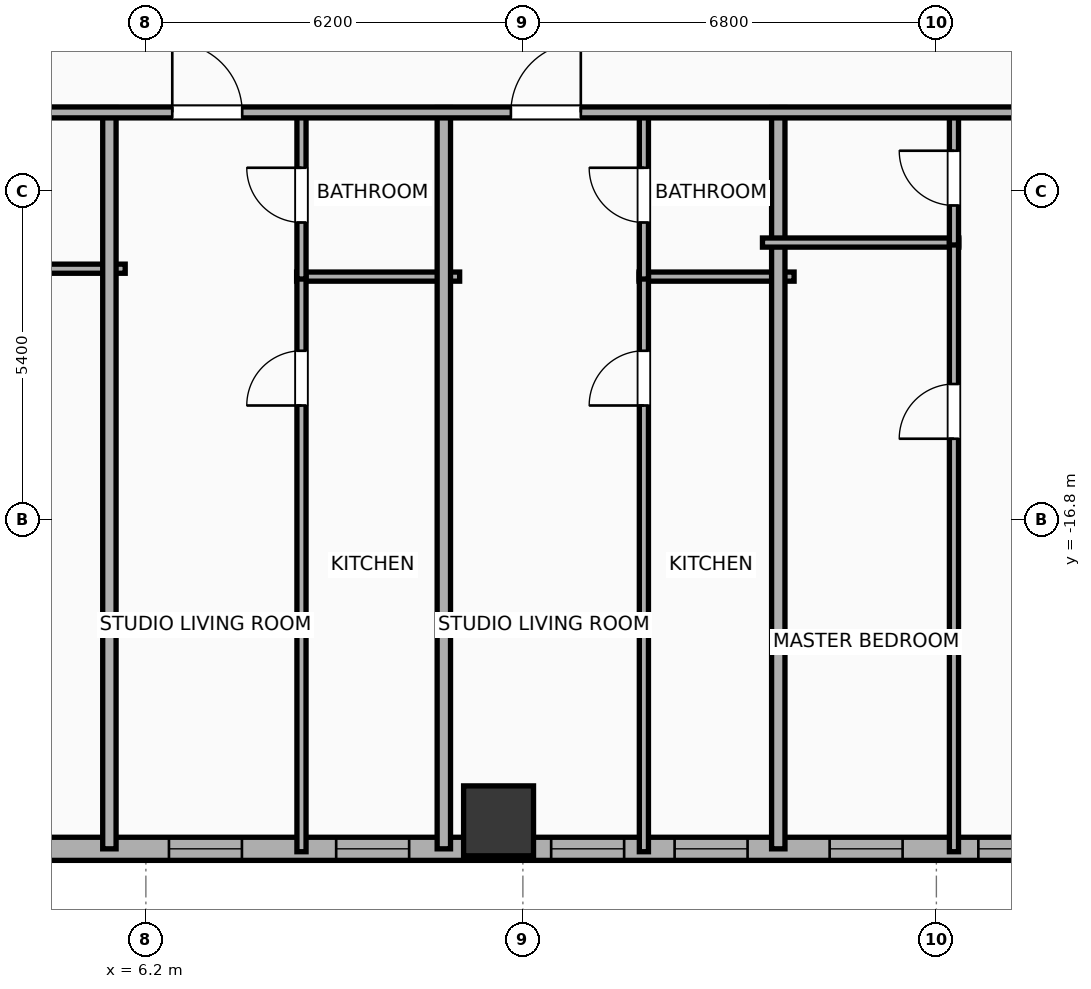
"""IFC4 building model, lengths in metres.
Left out: names, types, materials, properties, quantities, classifications, styles, units other than length and angle.
Written with IfcOpenShell. Run it as: python <this file> out.ifc"""

import sys

from ifc_helpers import new_model, si_unit, direction, frame, frame_2d, origin, origin_2d, place, context, subcontext, project, spatial, rectangle, hollow_rectangle, extrude, element, fill, save


model = new_model("IFC4")
c1 = context("Model", 3, precision=1e-05, world=origin(), true_north=direction((0.0, 1.0)))
c2 = subcontext(c1, "Body", "Model", "MODEL_VIEW")
j1 = project(units=[si_unit("LENGTHUNIT", "METRE"), si_unit("PLANEANGLEUNIT", "RADIAN")], contexts=[c1])
p1 = place(None, origin())
s1 = spatial("IfcSite", under=j1, at=p1, CompositionType="ELEMENT")
p2 = place(p1, origin())
s2 = spatial("IfcBuilding", under=s1, at=p2, CompositionType="ELEMENT")
p3 = place(p2, frame((0.0, 0.0, 37.7)))
s3 = spatial("IfcBuildingStorey", under=s2, at=p3, CompositionType="ELEMENT", Elevation=37.7)
p4 = place(p3, frame((12.0, -21.75, 0.0), z_axis=(0.0, 0.0, 1.0), x_axis=(1.0, 0.0, 0.0)))
e1 = element("IfcColumn", 1, at=p4, inside=s3, PredefinedType="COLUMN", context=c2, shape_type="SweptSolid", body=[
    extrude(hollow_rectangle(XDim=1.15, YDim=1.15, WallThickness=0.04, at=origin_2d()), origin(), (0.0, 0.0, 1.0), 3.9),
])
p5 = place(p3, frame((22.381, -22.21, 0.0), z_axis=(0.0, 0.0, 1.0), x_axis=(-1.0, 0.0, 0.0)))
e2 = element("IfcWall", 2, at=p5, inside=s3, PredefinedType="ELEMENTEDWALL", context=c2, shape_type="SweptSolid", body=[
    extrude(rectangle(XDim=51.963, YDim=0.38, at=frame_2d((25.981, 0.0))), origin(), (0.0, 0.0, 1.0), 3.65),
])
p6 = place(p5, frame((42.952, 0.0, 0.75)))
e3 = element("IfcOpeningElement", 3, at=p6, cuts=e2, PredefinedType="OPENING", context=c2, shape_type="SweptSolid", body=[
    extrude(rectangle(XDim=2.4, YDim=2.1, at=frame_2d((1.2, 1.05))), frame((0.0, 0.2, 0.0), z_axis=(0.0, -1.0, 0.0), x_axis=(1.0, 0.0, 0.0)), (0.0, 0.0, 1.0), 0.4),
])
p7 = place(p5, frame((49.847, 0.0, 0.75)))
e4 = element("IfcOpeningElement", 4, at=p7, cuts=e2, PredefinedType="OPENING", context=c2, shape_type="SweptSolid", body=[
    extrude(rectangle(XDim=1.2, YDim=2.05, at=frame_2d((0.6, 1.025))), frame((0.0, 0.2, 0.0), z_axis=(0.0, -1.0, 0.0), x_axis=(1.0, 0.0, 0.0)), (0.0, 0.0, 1.0), 0.4),
])
p8 = place(p5, frame((47.445, 0.0, 0.75)))
e5 = element("IfcOpeningElement", 5, at=p8, cuts=e2, PredefinedType="OPENING", context=c2, shape_type="SweptSolid", body=[
    extrude(rectangle(XDim=1.2, YDim=2.05, at=frame_2d((0.6, 1.025))), frame((0.0, 0.2, 0.0), z_axis=(0.0, -1.0, 0.0), x_axis=(1.0, 0.0, 0.0)), (0.0, 0.0, 1.0), 0.4),
])
p9 = place(p5, frame((39.526, 0.0, 0.75)))
e6 = element("IfcOpeningElement", 6, at=p9, cuts=e2, PredefinedType="OPENING", context=c2, shape_type="SweptSolid", body=[
    extrude(rectangle(XDim=1.2, YDim=2.05, at=frame_2d((0.6, 1.025))), frame((0.0, 0.2, 0.0), z_axis=(0.0, -1.0, 0.0), x_axis=(1.0, 0.0, 0.0)), (0.0, 0.0, 1.0), 0.4),
])
p10 = place(p5, frame((33.018, 0.0, 0.75)))
e7 = element("IfcOpeningElement", 7, at=p10, cuts=e2, PredefinedType="OPENING", context=c2, shape_type="SweptSolid", body=[
    extrude(rectangle(XDim=1.2, YDim=2.05, at=frame_2d((0.6, 1.025))), frame((0.0, 0.2, 0.0), z_axis=(0.0, -1.0, 0.0), x_axis=(1.0, 0.0, 0.0)), (0.0, 0.0, 1.0), 0.4),
])
p11 = place(p5, frame((36.813, 0.0, 0.75)))
e8 = element("IfcOpeningElement", 8, at=p11, cuts=e2, PredefinedType="OPENING", context=c2, shape_type="SweptSolid", body=[
    extrude(rectangle(XDim=1.2, YDim=2.05, at=frame_2d((0.6, 1.025))), frame((0.0, 0.2, 0.0), z_axis=(0.0, -1.0, 0.0), x_axis=(1.0, 0.0, 0.0)), (0.0, 0.0, 1.0), 0.4),
])
p12 = place(p5, frame((28.886, 0.0, 0.75)))
e9 = element("IfcOpeningElement", 9, at=p12, cuts=e2, PredefinedType="OPENING", context=c2, shape_type="SweptSolid", body=[
    extrude(rectangle(XDim=1.2, YDim=2.05, at=frame_2d((0.6, 1.025))), frame((0.0, 0.2, 0.0), z_axis=(0.0, -1.0, 0.0), x_axis=(1.0, 0.0, 0.0)), (0.0, 0.0, 1.0), 0.4),
])
p13 = place(p5, frame((23.306, 0.0, 0.75)))
e10 = element("IfcOpeningElement", 10, at=p13, cuts=e2, PredefinedType="OPENING", context=c2, shape_type="SweptSolid", body=[
    extrude(rectangle(XDim=1.2, YDim=2.05, at=frame_2d((0.6, 1.025))), frame((0.0, 0.2, 0.0), z_axis=(0.0, -1.0, 0.0), x_axis=(1.0, 0.0, 0.0)), (0.0, 0.0, 1.0), 0.4),
])
p14 = place(p5, frame((26.056, 0.0, 0.75)))
e11 = element("IfcOpeningElement", 11, at=p14, cuts=e2, PredefinedType="OPENING", context=c2, shape_type="SweptSolid", body=[
    extrude(rectangle(XDim=1.2, YDim=2.05, at=frame_2d((0.6, 1.025))), frame((0.0, 0.2, 0.0), z_axis=(0.0, -1.0, 0.0), x_axis=(1.0, 0.0, 0.0)), (0.0, 0.0, 1.0), 0.4),
])
p15 = place(p5, frame((18.811, 0.0, 0.75)))
e12 = element("IfcOpeningElement", 12, at=p15, cuts=e2, PredefinedType="OPENING", context=c2, shape_type="SweptSolid", body=[
    extrude(rectangle(XDim=1.2, YDim=2.05, at=frame_2d((0.6, 1.025))), frame((0.0, 0.2, 0.0), z_axis=(0.0, -1.0, 0.0), x_axis=(1.0, 0.0, 0.0)), (0.0, 0.0, 1.0), 0.4),
])
p16 = place(p5, frame((14.602, 0.0, 0.75)))
e13 = element("IfcOpeningElement", 13, at=p16, cuts=e2, PredefinedType="OPENING", context=c2, shape_type="SweptSolid", body=[
    extrude(rectangle(XDim=1.2, YDim=2.05, at=frame_2d((0.6, 1.025))), frame((0.0, 0.2, 0.0), z_axis=(0.0, -1.0, 0.0), x_axis=(1.0, 0.0, 0.0)), (0.0, 0.0, 1.0), 0.4),
])
p17 = place(p5, frame((11.852, 0.0, 0.75)))
e14 = element("IfcOpeningElement", 14, at=p17, cuts=e2, PredefinedType="OPENING", context=c2, shape_type="SweptSolid", body=[
    extrude(rectangle(XDim=1.2, YDim=2.05, at=frame_2d((0.6, 1.025))), frame((0.0, 0.2, 0.0), z_axis=(0.0, -1.0, 0.0), x_axis=(1.0, 0.0, 0.0)), (0.0, 0.0, 1.0), 0.4),
])
p18 = place(p5, frame((8.316, 0.0, 0.75)))
e15 = element("IfcOpeningElement", 15, at=p18, cuts=e2, PredefinedType="OPENING", context=c2, shape_type="SweptSolid", body=[
    extrude(rectangle(XDim=1.2, YDim=2.05, at=frame_2d((0.6, 1.025))), frame((0.0, 0.2, 0.0), z_axis=(0.0, -1.0, 0.0), x_axis=(1.0, 0.0, 0.0)), (0.0, 0.0, 1.0), 0.4),
])
p19 = place(p5, frame((6.286, 0.0, 0.75)))
e16 = element("IfcOpeningElement", 16, at=p19, cuts=e2, PredefinedType="OPENING", context=c2, shape_type="SweptSolid", body=[
    extrude(rectangle(XDim=1.2, YDim=2.05, at=frame_2d((0.6, 1.025))), frame((0.0, 0.2, 0.0), z_axis=(0.0, -1.0, 0.0), x_axis=(1.0, 0.0, 0.0)), (0.0, 0.0, 1.0), 0.4),
])
p20 = place(p5, frame((3.737, 0.0, 0.75)))
e17 = element("IfcOpeningElement", 17, at=p20, cuts=e2, PredefinedType="OPENING", context=c2, shape_type="SweptSolid", body=[
    extrude(rectangle(XDim=1.2, YDim=2.05, at=frame_2d((0.6, 1.025))), frame((0.0, 0.2, 0.0), z_axis=(0.0, -1.0, 0.0), x_axis=(1.0, 0.0, 0.0)), (0.0, 0.0, 1.0), 0.4),
])
p21 = place(p5, frame((1.291, 0.0, 0.75)))
e18 = element("IfcOpeningElement", 18, at=p21, cuts=e2, PredefinedType="OPENING", context=c2, shape_type="SweptSolid", body=[
    extrude(rectangle(XDim=1.2, YDim=2.05, at=frame_2d((0.6, 1.025))), frame((0.0, 0.2, 0.0), z_axis=(0.0, -1.0, 0.0), x_axis=(1.0, 0.0, 0.0)), (0.0, 0.0, 1.0), 0.4),
])
p22 = place(p3, frame((3.651, -12.67, 0.0), z_axis=(0.0, 0.0, 1.0), x_axis=(1.0, 0.0, 0.0)))
e19 = element("IfcWall", 19, at=p22, inside=s3, PredefinedType="PLUMBINGWALL", context=c2, shape_type="SweptSolid", body=[
    extrude(rectangle(XDim=2.209, YDim=0.15, at=frame_2d((1.104, 0.0))), origin(), (0.0, 0.0, 1.0), 3.65),
])
p23 = place(p3, frame((5.6, -22.21, 0.0), z_axis=(0.0, 0.0, 1.0), x_axis=(0.0, 1.0, 0.0)))
e20 = element("IfcWall", 20, at=p23, inside=s3, PredefinedType="PARTITIONING", context=c2, shape_type="SweptSolid", body=[
    extrude(rectangle(XDim=12.19, YDim=0.22, at=frame_2d((6.095, 0.0))), origin(), (0.0, 0.0, 1.0), 3.65),
])
p24 = place(p3, frame((8.679, -12.8, 0.0), z_axis=(0.0, 0.0, 1.0), x_axis=(1.0, 0.0, 0.0)))
e21 = element("IfcWall", 21, at=p24, inside=s3, PredefinedType="PLUMBINGWALL", context=c2, shape_type="SweptSolid", body=[
    extrude(rectangle(XDim=2.681, YDim=0.15, at=frame_2d((1.341, 0.0))), origin(), (0.0, 0.0, 1.0), 3.65),
])
p25 = place(p3, frame((8.759, -22.258, 0.0), z_axis=(0.0, 0.0, 1.0), x_axis=(0.0, 1.0, 0.0)))
e22 = element("IfcWall", 22, at=p25, inside=s3, PredefinedType="PLUMBINGWALL", context=c2, shape_type="SweptSolid", body=[
    extrude(rectangle(XDim=9.498, YDim=0.15, at=frame_2d((4.749, 0.0))), origin(), (0.0, 0.0, 1.0), 3.65),
])
p26 = place(p25, frame((7.338, 0.0, 0.0)))
e23 = element("IfcOpeningElement", 23, at=p26, cuts=e22, PredefinedType="OPENING", context=c2, shape_type="SweptSolid", body=[
    extrude(rectangle(XDim=0.9, YDim=2.05, at=frame_2d((0.45, 1.025))), frame((0.0, 0.085, 0.0), z_axis=(0.0, -1.0, 0.0), x_axis=(1.0, 0.0, 0.0)), (0.0, 0.0, 1.0), 0.17),
])
p27 = place(p3, frame((8.759, -12.84, 0.0), z_axis=(0.0, 0.0, 1.0), x_axis=(0.0, 1.0, 0.0)))
e24 = element("IfcWall", 24, at=p27, inside=s3, PredefinedType="PLUMBINGWALL", context=c2, shape_type="SweptSolid", body=[
    extrude(rectangle(XDim=2.76, YDim=0.15, at=frame_2d((1.38, 0.0))), origin(), (0.0, 0.0, 1.0), 3.65),
])
p28 = place(p27, frame((0.93, 0.0, 0.0)))
e25 = element("IfcOpeningElement", 25, at=p28, cuts=e24, PredefinedType="OPENING", context=c2, shape_type="SweptSolid", body=[
    extrude(rectangle(XDim=0.9, YDim=2.05, at=frame_2d((0.45, 1.025))), frame((0.0, 0.085, 0.0), z_axis=(0.0, -1.0, 0.0), x_axis=(1.0, 0.0, 0.0)), (0.0, 0.0, 1.0), 0.17),
])
p29 = place(p3, frame((11.1, -22.21, 0.0), z_axis=(0.0, 0.0, 1.0), x_axis=(0.0, 1.0, 0.0)))
e26 = element("IfcWall", 26, at=p29, inside=s3, PredefinedType="PARTITIONING", context=c2, shape_type="SweptSolid", body=[
    extrude(rectangle(XDim=12.19, YDim=0.22, at=frame_2d((6.095, 0.0))), origin(), (0.0, 0.0, 1.0), 3.65),
])
p30 = place(p3, frame((14.31, -12.8, 0.0), z_axis=(0.0, 0.0, 1.0), x_axis=(1.0, 0.0, 0.0)))
e27 = element("IfcWall", 27, at=p30, inside=s3, PredefinedType="PLUMBINGWALL", context=c2, shape_type="SweptSolid", body=[
    extrude(rectangle(XDim=2.55, YDim=0.15, at=frame_2d((1.275, 0.0))), origin(), (0.0, 0.0, 1.0), 3.65),
])
p31 = place(p3, frame((14.39, -22.258, 0.0), z_axis=(0.0, 0.0, 1.0), x_axis=(0.0, 1.0, 0.0)))
e28 = element("IfcWall", 28, at=p31, inside=s3, PredefinedType="PLUMBINGWALL", context=c2, shape_type="SweptSolid", body=[
    extrude(rectangle(XDim=9.498, YDim=0.15, at=frame_2d((4.749, 0.0))), origin(), (0.0, 0.0, 1.0), 3.65),
])
p32 = place(p31, frame((7.338, 0.0, 0.0)))
e29 = element("IfcOpeningElement", 29, at=p32, cuts=e28, PredefinedType="OPENING", context=c2, shape_type="SweptSolid", body=[
    extrude(rectangle(XDim=0.9, YDim=2.05, at=frame_2d((0.45, 1.025))), frame((0.0, 0.085, 0.0), z_axis=(0.0, -1.0, 0.0), x_axis=(1.0, 0.0, 0.0)), (0.0, 0.0, 1.0), 0.17),
])
p33 = place(p3, frame((14.39, -12.84, 0.0), z_axis=(0.0, 0.0, 1.0), x_axis=(0.0, 1.0, 0.0)))
e30 = element("IfcWall", 30, at=p33, inside=s3, PredefinedType="PLUMBINGWALL", context=c2, shape_type="SweptSolid", body=[
    extrude(rectangle(XDim=2.76, YDim=0.15, at=frame_2d((1.38, 0.0))), origin(), (0.0, 0.0, 1.0), 3.65),
])
p34 = place(p33, frame((0.93, 0.0, 0.0)))
e31 = element("IfcOpeningElement", 31, at=p34, cuts=e30, PredefinedType="OPENING", context=c2, shape_type="SweptSolid", body=[
    extrude(rectangle(XDim=0.9, YDim=2.05, at=frame_2d((0.45, 1.025))), frame((0.0, 0.085, 0.0), z_axis=(0.0, -1.0, 0.0), x_axis=(1.0, 0.0, 0.0)), (0.0, 0.0, 1.0), 0.17),
])
p35 = place(p3, frame((16.6, -22.21, 0.0), z_axis=(0.0, 0.0, 1.0), x_axis=(0.0, 1.0, 0.0)))
e32 = element("IfcWall", 32, at=p35, inside=s3, PredefinedType="PARTITIONING", context=c2, shape_type="SweptSolid", body=[
    extrude(rectangle(XDim=12.19, YDim=0.22, at=frame_2d((6.095, 0.0))), origin(), (0.0, 0.0, 1.0), 3.65),
])
p36 = place(p3, frame((16.34, -12.24, 0.0), z_axis=(0.0, 0.0, 1.0), x_axis=(1.0, 0.0, 0.0)))
e33 = element("IfcWall", 33, at=p36, inside=s3, PredefinedType="PLUMBINGWALL", context=c2, shape_type="SweptSolid", body=[
    extrude(rectangle(XDim=3.229, YDim=0.15, at=frame_2d((1.615, 0.0))), origin(), (0.0, 0.0, 1.0), 3.65),
])
p37 = place(p3, frame((19.489, -22.258, 0.0), z_axis=(0.0, 0.0, 1.0), x_axis=(0.0, 1.0, 0.0)))
e34 = element("IfcWall", 34, at=p37, inside=s3, PredefinedType="PLUMBINGWALL", context=c2, shape_type="SweptSolid", body=[
    extrude(rectangle(XDim=10.058, YDim=0.15, at=frame_2d((5.029, 0.0))), origin(), (0.0, 0.0, 1.0), 3.65),
])
p38 = place(p37, frame((6.792, 0.0, 0.0)))
e35 = element("IfcOpeningElement", 35, at=p38, cuts=e34, PredefinedType="OPENING", context=c2, shape_type="SweptSolid", body=[
    extrude(rectangle(XDim=0.9, YDim=2.05, at=frame_2d((0.45, 1.025))), frame((0.0, 0.085, 0.0), z_axis=(0.0, -1.0, 0.0), x_axis=(1.0, 0.0, 0.0)), (0.0, 0.0, 1.0), 0.17),
])
p39 = place(p3, frame((19.489, -12.28, 0.0), z_axis=(0.0, 0.0, 1.0), x_axis=(0.0, 1.0, 0.0)))
e36 = element("IfcWall", 36, at=p39, inside=s3, PredefinedType="PLUMBINGWALL", context=c2, shape_type="SweptSolid", body=[
    extrude(rectangle(XDim=2.2, YDim=0.15, at=frame_2d((1.1, 0.0))), origin(), (0.0, 0.0, 1.0), 3.65),
])
p40 = place(p39, frame((0.65, 0.0, 0.0)))
e37 = element("IfcOpeningElement", 37, at=p40, cuts=e36, PredefinedType="OPENING", context=c2, shape_type="SweptSolid", body=[
    extrude(rectangle(XDim=0.9, YDim=2.05, at=frame_2d((0.45, 1.025))), frame((0.0, 0.085, 0.0), z_axis=(0.0, -1.0, 0.0), x_axis=(1.0, 0.0, 0.0)), (0.0, 0.0, 1.0), 0.17),
])
p41 = place(p3, frame((-33.41, -10.1, 0.0), z_axis=(0.0, 0.0, 1.0), x_axis=(1.0, 0.0, 0.0)))
e38 = element("IfcWall", 38, at=p41, inside=s3, PredefinedType="PARTITIONING", context=c2, shape_type="SweptSolid", body=[
    extrude(rectangle(XDim=59.62, YDim=0.18, at=frame_2d((29.81, 0.0))), origin(), (0.0, 0.0, 1.0), 3.65),
])
p42 = place(p41, frame((2.746, 0.0, 0.0)))
e39 = element("IfcOpeningElement", 39, at=p42, cuts=e38, PredefinedType="OPENING", context=c2, shape_type="SweptSolid", body=[
    extrude(rectangle(XDim=0.9, YDim=2.05, at=frame_2d((0.45, 1.025))), frame((0.0, 0.1, 0.0), z_axis=(0.0, -1.0, 0.0), x_axis=(1.0, 0.0, 0.0)), (0.0, 0.0, 1.0), 0.2),
])
p43 = place(p41, frame((11.552, 0.0, 0.0)))
e40 = element("IfcOpeningElement", 40, at=p43, cuts=e38, PredefinedType="OPENING", context=c2, shape_type="SweptSolid", body=[
    extrude(rectangle(XDim=1.15, YDim=2.05, at=frame_2d((0.575, 1.025))), frame((0.0, 0.1, 0.0), z_axis=(0.0, -1.0, 0.0), x_axis=(1.0, 0.0, 0.0)), (0.0, 0.0, 1.0), 0.2),
])
p44 = place(p41, frame((22.379, 0.0, 0.0)))
e41 = element("IfcOpeningElement", 41, at=p44, cuts=e38, PredefinedType="OPENING", context=c2, shape_type="SweptSolid", body=[
    extrude(rectangle(XDim=1.15, YDim=2.05, at=frame_2d((0.575, 1.025))), frame((0.0, 0.1, 0.0), z_axis=(0.0, -1.0, 0.0), x_axis=(1.0, 0.0, 0.0)), (0.0, 0.0, 1.0), 0.2),
])
p45 = place(p41, frame((31.28, 0.0, 0.0)))
e42 = element("IfcOpeningElement", 42, at=p45, cuts=e38, PredefinedType="OPENING", context=c2, shape_type="SweptSolid", body=[
    extrude(rectangle(XDim=1.15, YDim=2.05, at=frame_2d((0.575, 1.025))), frame((0.0, 0.1, 0.0), z_axis=(0.0, -1.0, 0.0), x_axis=(1.0, 0.0, 0.0)), (0.0, 0.0, 1.0), 0.2),
])
p46 = place(p41, frame((36.02, 0.0, 0.0)))
e43 = element("IfcOpeningElement", 43, at=p46, cuts=e38, PredefinedType="OPENING", context=c2, shape_type="SweptSolid", body=[
    extrude(rectangle(XDim=0.9, YDim=2.05, at=frame_2d((0.45, 1.025))), frame((0.0, 0.1, 0.0), z_axis=(0.0, -1.0, 0.0), x_axis=(1.0, 0.0, 0.0)), (0.0, 0.0, 1.0), 0.2),
])
p47 = place(p41, frame((40.044, 0.0, 0.0)))
e44 = element("IfcOpeningElement", 44, at=p47, cuts=e38, PredefinedType="OPENING", context=c2, shape_type="SweptSolid", body=[
    extrude(rectangle(XDim=1.15, YDim=2.05, at=frame_2d((0.575, 1.025))), frame((0.0, 0.1, 0.0), z_axis=(0.0, -1.0, 0.0), x_axis=(1.0, 0.0, 0.0)), (0.0, 0.0, 1.0), 0.2),
])
p48 = place(p41, frame((45.613, 0.0, 0.0)))
e45 = element("IfcOpeningElement", 45, at=p48, cuts=e38, PredefinedType="OPENING", context=c2, shape_type="SweptSolid", body=[
    extrude(rectangle(XDim=1.15, YDim=2.05, at=frame_2d((0.575, 1.025))), frame((0.0, 0.1, 0.0), z_axis=(0.0, -1.0, 0.0), x_axis=(1.0, 0.0, 0.0)), (0.0, 0.0, 1.0), 0.2),
])
p49 = place(p41, frame((54.174, 0.0, 0.0)))
e46 = element("IfcOpeningElement", 46, at=p49, cuts=e38, PredefinedType="OPENING", context=c2, shape_type="SweptSolid", body=[
    extrude(rectangle(XDim=1.15, YDim=2.05, at=frame_2d((0.575, 1.025))), frame((0.0, 0.1, 0.0), z_axis=(0.0, -1.0, 0.0), x_axis=(1.0, 0.0, 0.0)), (0.0, 0.0, 1.0), 0.2),
])
p50 = place(p16, origin())
e47 = element("IfcWindow", 47, at=p50, inside=s3, PartitioningType="SINGLE_PANEL", PredefinedType="WINDOW", context=c2, shape_type="SweptSolid", body=[
    extrude(rectangle(XDim=1.2, YDim=2.05, at=frame_2d((0.6, 1.025))), frame((0.0, 0.03, 0.0), z_axis=(0.0, -1.0, 0.0), x_axis=(1.0, 0.0, 0.0)), (0.0, 0.0, 1.0), 0.06),
])
fill(e13, e47)
p51 = place(p17, origin())
e48 = element("IfcWindow", 48, at=p51, inside=s3, PartitioningType="SINGLE_PANEL", PredefinedType="WINDOW", context=c2, shape_type="SweptSolid", body=[
    extrude(rectangle(XDim=1.2, YDim=2.05, at=frame_2d((0.6, 1.025))), frame((0.0, 0.03, 0.0), z_axis=(0.0, -1.0, 0.0), x_axis=(1.0, 0.0, 0.0)), (0.0, 0.0, 1.0), 0.06),
])
fill(e14, e48)
p52 = place(p18, origin())
e49 = element("IfcWindow", 49, at=p52, inside=s3, PartitioningType="SINGLE_PANEL", PredefinedType="WINDOW", context=c2, shape_type="SweptSolid", body=[
    extrude(rectangle(XDim=1.2, YDim=2.05, at=frame_2d((0.6, 1.025))), frame((0.0, 0.03, 0.0), z_axis=(0.0, -1.0, 0.0), x_axis=(1.0, 0.0, 0.0)), (0.0, 0.0, 1.0), 0.06),
])
fill(e15, e49)
p53 = place(p19, origin())
e50 = element("IfcWindow", 50, at=p53, inside=s3, PartitioningType="SINGLE_PANEL", PredefinedType="WINDOW", context=c2, shape_type="SweptSolid", body=[
    extrude(rectangle(XDim=1.2, YDim=2.05, at=frame_2d((0.6, 1.025))), frame((0.0, 0.03, 0.0), z_axis=(0.0, -1.0, 0.0), x_axis=(1.0, 0.0, 0.0)), (0.0, 0.0, 1.0), 0.06),
])
fill(e16, e50)
p54 = place(p20, origin())
e51 = element("IfcWindow", 51, at=p54, inside=s3, PartitioningType="SINGLE_PANEL", PredefinedType="WINDOW", context=c2, shape_type="SweptSolid", body=[
    extrude(rectangle(XDim=1.2, YDim=2.05, at=frame_2d((0.6, 1.025))), frame((0.0, 0.03, 0.0), z_axis=(0.0, -1.0, 0.0), x_axis=(1.0, 0.0, 0.0)), (0.0, 0.0, 1.0), 0.06),
])
fill(e17, e51)
p55 = place(p21, origin())
e52 = element("IfcWindow", 52, at=p55, inside=s3, PartitioningType="SINGLE_PANEL", PredefinedType="WINDOW", context=c2, shape_type="SweptSolid", body=[
    extrude(rectangle(XDim=1.2, YDim=2.05, at=frame_2d((0.6, 1.025))), frame((0.0, 0.03, 0.0), z_axis=(0.0, -1.0, 0.0), x_axis=(1.0, 0.0, 0.0)), (0.0, 0.0, 1.0), 0.06),
])
fill(e18, e52)
p56 = place(p26, origin())
e53 = element("IfcDoor", 53, at=p56, inside=s3, OperationType="SINGLE_SWING_LEFT", PredefinedType="DOOR", context=c2, shape_type="SweptSolid", body=[
    extrude(rectangle(XDim=0.9, YDim=2.05, at=frame_2d((0.45, 1.025))), frame((0.0, 0.025, 0.0), z_axis=(0.0, -1.0, 0.0), x_axis=(1.0, 0.0, 0.0)), (0.0, 0.0, 1.0), 0.05),
])
fill(e23, e53)
p57 = place(p28, origin())
e54 = element("IfcDoor", 54, at=p57, inside=s3, OperationType="SINGLE_SWING_RIGHT", PredefinedType="DOOR", context=c2, shape_type="SweptSolid", body=[
    extrude(rectangle(XDim=0.9, YDim=2.05, at=frame_2d((0.45, 1.025))), frame((0.0, 0.025, 0.0), z_axis=(0.0, -1.0, 0.0), x_axis=(1.0, 0.0, 0.0)), (0.0, 0.0, 1.0), 0.05),
])
fill(e25, e54)
p58 = place(p32, origin())
e55 = element("IfcDoor", 55, at=p58, inside=s3, OperationType="SINGLE_SWING_LEFT", PredefinedType="DOOR", context=c2, shape_type="SweptSolid", body=[
    extrude(rectangle(XDim=0.9, YDim=2.05, at=frame_2d((0.45, 1.025))), frame((0.0, 0.025, 0.0), z_axis=(0.0, -1.0, 0.0), x_axis=(1.0, 0.0, 0.0)), (0.0, 0.0, 1.0), 0.05),
])
fill(e29, e55)
p59 = place(p34, origin())
e56 = element("IfcDoor", 56, at=p59, inside=s3, OperationType="SINGLE_SWING_RIGHT", PredefinedType="DOOR", context=c2, shape_type="SweptSolid", body=[
    extrude(rectangle(XDim=0.9, YDim=2.05, at=frame_2d((0.45, 1.025))), frame((0.0, 0.025, 0.0), z_axis=(0.0, -1.0, 0.0), x_axis=(1.0, 0.0, 0.0)), (0.0, 0.0, 1.0), 0.05),
])
fill(e31, e56)
p60 = place(p38, origin())
e57 = element("IfcDoor", 57, at=p60, inside=s3, OperationType="SINGLE_SWING_LEFT", PredefinedType="DOOR", context=c2, shape_type="SweptSolid", body=[
    extrude(rectangle(XDim=0.9, YDim=2.05, at=frame_2d((0.45, 1.025))), frame((0.0, 0.025, 0.0), z_axis=(0.0, -1.0, 0.0), x_axis=(1.0, 0.0, 0.0)), (0.0, 0.0, 1.0), 0.05),
])
fill(e35, e57)
p61 = place(p40, origin())
e58 = element("IfcDoor", 58, at=p61, inside=s3, OperationType="SINGLE_SWING_RIGHT", PredefinedType="DOOR", context=c2, shape_type="SweptSolid", body=[
    extrude(rectangle(XDim=0.9, YDim=2.05, at=frame_2d((0.45, 1.025))), frame((0.0, 0.025, 0.0), z_axis=(0.0, -1.0, 0.0), x_axis=(1.0, 0.0, 0.0)), (0.0, 0.0, 1.0), 0.05),
])
fill(e37, e58)
p62 = place(p47, origin())
e59 = element("IfcDoor", 59, at=p62, inside=s3, OperationType="SINGLE_SWING_LEFT", PredefinedType="DOOR", context=c2, shape_type="SweptSolid", body=[
    extrude(rectangle(XDim=1.15, YDim=2.05, at=frame_2d((0.575, 1.025))), frame((0.0, 0.025, 0.0), z_axis=(0.0, -1.0, 0.0), x_axis=(1.0, 0.0, 0.0)), (0.0, 0.0, 1.0), 0.05),
])
fill(e44, e59)
p63 = place(p48, origin())
e60 = element("IfcDoor", 60, at=p63, inside=s3, OperationType="SINGLE_SWING_RIGHT", PredefinedType="DOOR", context=c2, shape_type="SweptSolid", body=[
    extrude(rectangle(XDim=1.15, YDim=2.05, at=frame_2d((0.575, 1.025))), frame((0.0, 0.025, 0.0), z_axis=(0.0, -1.0, 0.0), x_axis=(1.0, 0.0, 0.0)), (0.0, 0.0, 1.0), 0.05),
])
fill(e45, e60)
save(model, sys.argv[1])
